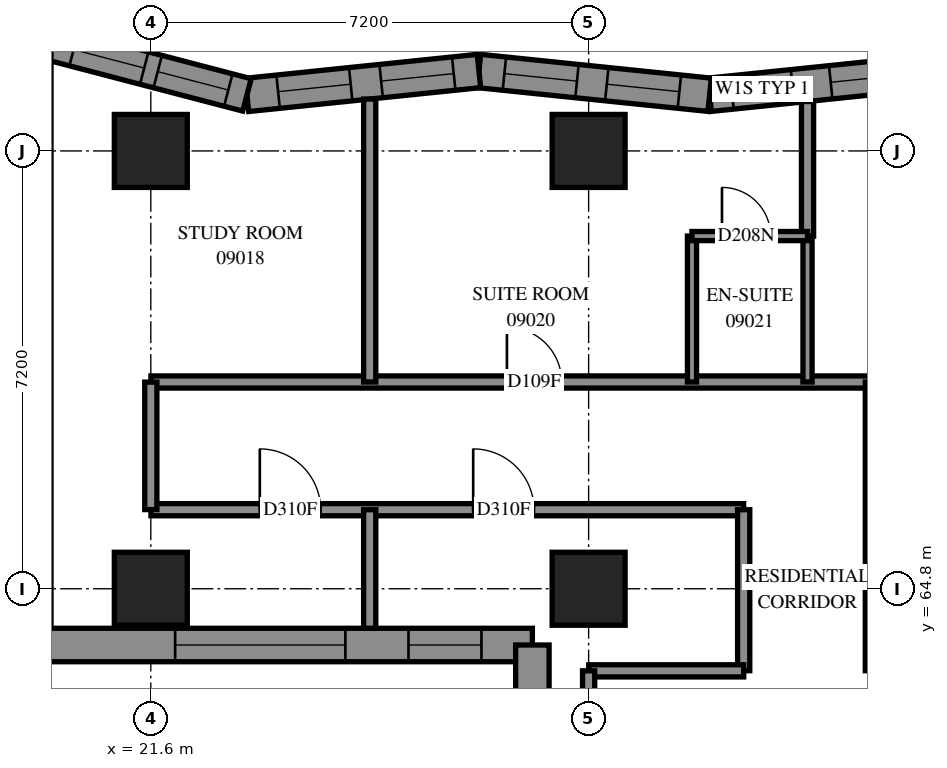
"""IFC4 building model, lengths in metres.
Left out: names, types, materials, properties, quantities, classifications, styles, units other than length and angle.
Written with IfcOpenShell. Run it as: python <this file> out.ifc"""

import sys

from ifc_helpers import new_model, si_unit, direction, frame, frame_2d, origin, origin_2d, place, context, subcontext, project, spatial, polyline, rectangle, outline, extrude, element, fill, save


model = new_model("IFC4")
c1 = context("Model", 3, precision=1e-05, world=origin(), true_north=direction((0.0, 1.0)))
c2 = subcontext(c1, "Body", "Model", "MODEL_VIEW")
j1 = project(units=[si_unit("LENGTHUNIT", "METRE"), si_unit("PLANEANGLEUNIT", "RADIAN")], contexts=[c1])
p1 = place(None, origin())
s1 = spatial("IfcSite", under=j1, at=p1, CompositionType="ELEMENT")
p2 = place(p1, origin())
s2 = spatial("IfcBuilding", under=s1, at=p2, CompositionType="ELEMENT")
p3 = place(p2, frame((0.0, 0.0, 37.2)))
s3 = spatial("IfcBuildingStorey", under=s2, at=p3, CompositionType="ELEMENT", Elevation=37.2)
for number, where, z_axis, x_axis in (
    (1, (21.6, 64.8, 0.0), (0.0, 0.0, 1.0), (1.0, 0.0, 0.0)),
    (2, (21.6, 72.0, 0.0), (0.0, 0.0, 1.0), (1.0, 0.0, 0.0)),
    (3, (28.8, 64.8, 0.0), (0.0, 0.0, 1.0), (1.0, 0.0, 0.0)),
    (4, (28.8, 72.0, 0.0), (0.0, 0.0, 1.0), (1.0, 0.0, 0.0)),
):
    element("IfcColumn", number, at=place(p3, frame(where, z_axis=z_axis, x_axis=x_axis)), inside=s3, PredefinedType="COLUMN", context=c2, shape_type="SweptSolid", body=[
        extrude(rectangle(XDim=1.2, YDim=1.2, at=origin_2d()), origin(), (0.0, 0.0, 1.0), 3.1),
    ])
p4 = place(p3, frame((34.584, 73.314, 0.0), z_axis=(0.0, 0.0, 1.0), x_axis=(-0.9947304076, -0.1025251975, 0.0)))
e5 = element("IfcWall", 5, at=p4, inside=s3, PredefinedType="SOLIDWALL", context=c2, shape_type="SweptSolid", body=[
    extrude(outline(polyline([(-0.028, -0.275), (3.785, -0.275), (3.842, 0.275), (0.028, 0.275), (-0.028, -0.275)])), origin(), (0.0, 0.0, 1.0), 3.1),
])
p5 = place(p4, frame((0.612, 0.0, 0.5)))
e6 = element("IfcOpeningElement", 6, at=p5, cuts=e5, PredefinedType="OPENING", context=c2, shape_type="SweptSolid", body=[
    extrude(rectangle(XDim=1.2, YDim=2.45, at=frame_2d((0.6, 1.225))), frame((0.0, 0.285, 0.0), z_axis=(0.0, -1.0, 0.0), x_axis=(1.0, 0.0, 0.0)), (0.0, 0.0, 1.0), 0.57),
])
p6 = place(p4, frame((2.444, 0.0, 0.45)))
e7 = element("IfcOpeningElement", 7, at=p6, cuts=e5, PredefinedType="OPENING", context=c2, shape_type="SweptSolid", body=[
    extrude(rectangle(XDim=1.0, YDim=2.5, at=frame_2d((0.5, 1.25))), frame((0.0, 0.285, 0.0), z_axis=(0.0, -1.0, 0.0), x_axis=(1.0, 0.0, 0.0)), (0.0, 0.0, 1.0), 0.57),
])
p7 = place(p3, frame((30.79, 72.924, 0.0), z_axis=(0.0, 0.0, 1.0), x_axis=(-0.9947306832, 0.1025225234, 0.0)))
e8 = element("IfcWall", 8, at=p7, inside=s3, PredefinedType="SOLIDWALL", context=c2, shape_type="SweptSolid", body=[
    extrude(outline(polyline([(0.028, -0.275), (3.842, -0.275), (3.785, 0.275), (-0.028, 0.275), (0.028, -0.275)])), origin(), (0.0, 0.0, 1.0), 3.1),
])
p8 = place(p7, frame((0.5, 0.0, 0.5)))
e9 = element("IfcOpeningElement", 9, at=p8, cuts=e8, PredefinedType="OPENING", context=c2, shape_type="SweptSolid", body=[
    extrude(rectangle(XDim=1.2, YDim=2.45, at=frame_2d((0.6, 1.225))), frame((0.0, 0.285, 0.0), z_axis=(0.0, -1.0, 0.0), x_axis=(1.0, 0.0, 0.0)), (0.0, 0.0, 1.0), 0.57),
])
p9 = place(p7, frame((2.193, 0.0, 0.5)))
e10 = element("IfcOpeningElement", 10, at=p9, cuts=e8, PredefinedType="OPENING", context=c2, shape_type="SweptSolid", body=[
    extrude(rectangle(XDim=1.2, YDim=2.45, at=frame_2d((0.6, 1.225))), frame((0.0, 0.285, 0.0), z_axis=(0.0, -1.0, 0.0), x_axis=(1.0, 0.0, 0.0)), (0.0, 0.0, 1.0), 0.57),
])
p10 = place(p3, frame((26.996, 73.314, 0.0), z_axis=(0.0, 0.0, 1.0), x_axis=(-0.9947305582, -0.1025237367, 0.0)))
e11 = element("IfcWall", 11, at=p10, inside=s3, PredefinedType="SOLIDWALL", context=c2, shape_type="SweptSolid", body=[
    extrude(outline(polyline([(-0.028, -0.275), (3.785, -0.275), (3.885, 0.275), (0.028, 0.275), (-0.028, -0.275)])), origin(), (0.0, 0.0, 1.0), 3.1),
])
p11 = place(p10, frame((0.417, 0.0, 0.5)))
e12 = element("IfcOpeningElement", 12, at=p11, cuts=e11, PredefinedType="OPENING", context=c2, shape_type="SweptSolid", body=[
    extrude(rectangle(XDim=1.2, YDim=2.45, at=frame_2d((0.6, 1.225))), frame((0.0, 0.285, 0.0), z_axis=(0.0, -1.0, 0.0), x_axis=(1.0, 0.0, 0.0)), (0.0, 0.0, 1.0), 0.57),
])
p12 = place(p10, frame((2.12, 0.0, 0.5)))
e13 = element("IfcOpeningElement", 13, at=p12, cuts=e11, PredefinedType="OPENING", context=c2, shape_type="SweptSolid", body=[
    extrude(rectangle(XDim=1.2, YDim=2.45, at=frame_2d((0.6, 1.225))), frame((0.0, 0.285, 0.0), z_axis=(0.0, -1.0, 0.0), x_axis=(1.0, 0.0, 0.0)), (0.0, 0.0, 1.0), 0.57),
])
p13 = place(p3, frame((23.181, 72.921, 0.0), z_axis=(0.0, 0.0, 1.0), x_axis=(-0.9675320185, 0.252748478, 0.0)))
e14 = element("IfcWall", 14, at=p13, inside=s3, PredefinedType="SOLIDWALL", context=c2, shape_type="SweptSolid", body=[
    extrude(outline(polyline([(0.05, -0.275), (3.971, -0.275), (3.259, 0.275), (-0.05, 0.275), (0.05, -0.275)])), origin(), (0.0, 0.0, 1.0), 3.1),
])
p14 = place(p13, frame((0.317, 0.0, 0.5)))
e15 = element("IfcOpeningElement", 15, at=p14, cuts=e14, PredefinedType="OPENING", context=c2, shape_type="SweptSolid", body=[
    extrude(rectangle(XDim=1.2, YDim=2.45, at=frame_2d((0.6, 1.225))), frame((0.0, 0.285, 0.0), z_axis=(0.0, -1.0, 0.0), x_axis=(1.0, 0.0, 0.0)), (0.0, 0.0, 1.0), 0.57),
])
p15 = place(p13, frame((1.746, 0.0, 0.5)))
e16 = element("IfcOpeningElement", 16, at=p15, cuts=e14, PredefinedType="OPENING", context=c2, shape_type="SweptSolid", body=[
    extrude(rectangle(XDim=1.2, YDim=2.45, at=frame_2d((0.6, 1.225))), frame((0.0, 0.285, 0.0), z_axis=(0.0, -1.0, 0.0), x_axis=(1.0, 0.0, 0.0)), (0.0, 0.0, 1.0), 0.57),
])
p16 = place(p3, frame((19.684, 63.875, 0.0), z_axis=(0.0, 0.0, 1.0), x_axis=(1.0, 0.0, 0.0)))
e17 = element("IfcWall", 17, at=p16, inside=s3, PredefinedType="SOLIDWALL", context=c2, shape_type="SweptSolid", body=[
    extrude(outline(polyline([(-0.275, -0.275), (7.916, -0.275), (8.466, 0.275), (0.275, 0.275), (-0.275, -0.275)])), origin(), (0.0, 0.0, 1.0), 3.1),
])
p17 = place(p16, frame((2.316, 0.0, 0.5)))
e18 = element("IfcOpeningElement", 18, at=p17, cuts=e17, PredefinedType="OPENING", context=c2, shape_type="SweptSolid", body=[
    extrude(rectangle(XDim=2.8, YDim=2.45, at=frame_2d((1.4, 1.225))), frame((0.0, 0.285, 0.0), z_axis=(0.0, -1.0, 0.0), x_axis=(1.0, 0.0, 0.0)), (0.0, 0.0, 1.0), 0.57),
])
p18 = place(p16, frame((6.154, 0.0, 0.5)))
e19 = element("IfcOpeningElement", 19, at=p18, cuts=e17, PredefinedType="OPENING", context=c2, shape_type="SweptSolid", body=[
    extrude(rectangle(XDim=1.2, YDim=2.45, at=frame_2d((0.6, 1.225))), frame((0.0, 0.285, 0.0), z_axis=(0.0, -1.0, 0.0), x_axis=(1.0, 0.0, 0.0)), (0.0, 0.0, 1.0), 0.57),
])
p19 = place(p3, frame((27.875, 63.875, 0.0), z_axis=(0.0, 0.0, 1.0), x_axis=(0.0, -1.0, 0.0)))
e20 = element("IfcWall", 20, at=p19, inside=s3, PredefinedType="SOLIDWALL", context=c2, shape_type="SweptSolid", body=[
    extrude(outline(polyline([(0.275, -0.275), (7.475, -0.275), (6.925, 0.275), (-0.275, 0.275), (0.275, -0.275)])), origin(), (0.0, 0.0, 1.0), 3.1),
])
p20 = place(p19, frame((0.838, 0.0, 0.5)))
e21 = element("IfcOpeningElement", 21, at=p20, cuts=e20, PredefinedType="OPENING", context=c2, shape_type="SweptSolid", body=[
    extrude(rectangle(XDim=1.2, YDim=2.45, at=frame_2d((0.6, 1.225))), frame((0.0, 0.285, 0.0), z_axis=(0.0, -1.0, 0.0), x_axis=(1.0, 0.0, 0.0)), (0.0, 0.0, 1.0), 0.57),
])
p21 = place(p19, frame((3.3, 0.0, 0.45)))
e22 = element("IfcOpeningElement", 22, at=p21, cuts=e20, PredefinedType="OPENING", context=c2, shape_type="SweptSolid", body=[
    extrude(rectangle(XDim=1.3, YDim=2.5, at=frame_2d((0.65, 1.25))), frame((0.0, 0.285, 0.0), z_axis=(0.0, -1.0, 0.0), x_axis=(1.0, 0.0, 0.0)), (0.0, 0.0, 1.0), 0.57),
])
p22 = place(p19, frame((5.05, 0.0, 0.45)))
e23 = element("IfcOpeningElement", 23, at=p22, cuts=e20, PredefinedType="OPENING", context=c2, shape_type="SweptSolid", body=[
    extrude(rectangle(XDim=0.8, YDim=2.5, at=frame_2d((0.4, 1.25))), frame((0.0, 0.285, 0.0), z_axis=(0.0, -1.0, 0.0), x_axis=(1.0, 0.0, 0.0)), (0.0, 0.0, 1.0), 0.57),
])
p23 = place(p3, frame((21.602, 68.2, 0.0), z_axis=(0.0, 0.0, 1.0), x_axis=(1.0, 0.0, 0.0)))
e24 = element("IfcWall", 24, at=p23, inside=s3, PredefinedType="PARTITIONING", context=c2, shape_type="SweptSolid", body=[
    extrude(rectangle(XDim=11.848, YDim=0.2, at=frame_2d((5.924, 0.0))), origin(), (0.0, 0.0, 1.0), 3.1),
])
p24 = place(p23, frame((5.855, 0.0, 0.0)))
e25 = element("IfcOpeningElement", 25, at=p24, cuts=e24, PredefinedType="OPENING", context=c2, shape_type="SweptSolid", body=[
    extrude(rectangle(XDim=0.9, YDim=2.1, at=frame_2d((0.45, 1.05))), frame((0.0, 0.11, 0.0), z_axis=(0.0, -1.0, 0.0), x_axis=(1.0, 0.0, 0.0)), (0.0, 0.0, 1.0), 0.22),
])
p25 = place(p3, frame((21.602, 66.1, 0.0), z_axis=(0.0, 0.0, 1.0), x_axis=(1.0, 0.0, 0.0)))
e26 = element("IfcWall", 26, at=p25, inside=s3, PredefinedType="PARTITIONING", context=c2, shape_type="SweptSolid", body=[
    extrude(rectangle(XDim=9.748, YDim=0.2, at=frame_2d((4.874, 0.0))), origin(), (0.0, 0.0, 1.0), 3.1),
])
p26 = place(p25, frame((1.791, 0.0, 0.0)))
e27 = element("IfcOpeningElement", 27, at=p26, cuts=e26, PredefinedType="OPENING", context=c2, shape_type="SweptSolid", body=[
    extrude(rectangle(XDim=1.0, YDim=2.1, at=frame_2d((0.5, 1.05))), frame((0.0, 0.11, 0.0), z_axis=(0.0, -1.0, 0.0), x_axis=(1.0, 0.0, 0.0)), (0.0, 0.0, 1.0), 0.22),
])
p27 = place(p25, frame((5.3, 0.0, 0.0)))
e28 = element("IfcOpeningElement", 28, at=p27, cuts=e26, PredefinedType="OPENING", context=c2, shape_type="SweptSolid", body=[
    extrude(rectangle(XDim=1.0, YDim=2.1, at=frame_2d((0.5, 1.05))), frame((0.0, 0.11, 0.0), z_axis=(0.0, -1.0, 0.0), x_axis=(1.0, 0.0, 0.0)), (0.0, 0.0, 1.0), 0.22),
])
p28 = place(p3, frame((33.45, 63.452, 0.0), z_axis=(0.0, 0.0, 1.0), x_axis=(0.0, 1.0, 0.0)))
e29 = element("IfcWall", 29, at=p28, inside=s3, PredefinedType="PARTITIONING", context=c2, shape_type="SweptSolid", body=[
    extrude(rectangle(XDim=4.748, YDim=0.2, at=frame_2d((2.374, 0.0))), origin(), (0.0, 0.0, 1.0), 3.1),
])
p29 = place(p3, frame((25.2, 68.2, 0.0), z_axis=(0.0, 0.0, 1.0), x_axis=(0.0, 1.0, 0.0)))
e30 = element("IfcWall", 30, at=p29, inside=s3, PredefinedType="PARTITIONING", context=c2, shape_type="SweptSolid", body=[
    extrude(rectangle(XDim=4.653, YDim=0.2, at=frame_2d((2.326, 0.0))), origin(), (0.0, 0.0, 1.0), 3.1),
])
p30 = place(p3, frame((31.35, 63.452, 0.0), z_axis=(0.0, 0.0, 1.0), x_axis=(0.0, 1.0, 0.0)))
e31 = element("IfcWall", 31, at=p30, inside=s3, PredefinedType="PARTITIONING", context=c2, shape_type="SweptSolid", body=[
    extrude(rectangle(XDim=2.648, YDim=0.2, at=frame_2d((1.324, 0.0))), origin(), (0.0, 0.0, 1.0), 3.1),
])
p31 = place(p3, frame((28.802, 63.45, 0.0), z_axis=(0.0, 0.0, 1.0), x_axis=(1.0, 0.0, 0.0)))
e32 = element("IfcWall", 32, at=p31, inside=s3, PredefinedType="PARTITIONING", context=c2, shape_type="SweptSolid", body=[
    extrude(rectangle(XDim=2.548, YDim=0.2, at=frame_2d((1.274, 0.0))), origin(), (0.0, 0.0, 1.0), 3.1),
])
for number, where, z_axis, x_axis in (
    (33, (30.5, 68.2, 0.0), (0.0, 0.0, 1.0), (0.0, 1.0, 0.0)),
    (34, (32.4, 68.2, 0.0), (0.0, 0.0, 1.0), (0.0, 1.0, 0.0)),
):
    element("IfcWall", number, at=place(p3, frame(where, z_axis=z_axis, x_axis=x_axis)), inside=s3, PredefinedType="PARTITIONING", context=c2, shape_type="SweptSolid", body=[
        extrude(rectangle(XDim=2.4, YDim=0.15, at=frame_2d((1.2, 0.0))), origin(), (0.0, 0.0, 1.0), 3.1),
    ])
p32 = place(p3, frame((32.4, 70.6, 0.0), z_axis=(0.0, 0.0, 1.0), x_axis=(0.0, 1.0, 0.0)))
e35 = element("IfcWall", 35, at=p32, inside=s3, PredefinedType="PARTITIONING", context=c2, shape_type="SweptSolid", body=[
    extrude(rectangle(XDim=2.213, YDim=0.2, at=frame_2d((1.107, 0.0))), origin(), (0.0, 0.0, 1.0), 3.1),
])
p33 = place(p3, frame((28.8, 61.35, 0.0), z_axis=(0.0, 0.0, 1.0), x_axis=(0.0, 1.0, 0.0)))
e36 = element("IfcWall", 36, at=p33, inside=s3, PredefinedType="PARTITIONING", context=c2, shape_type="SweptSolid", body=[
    extrude(rectangle(XDim=2.1, YDim=0.2, at=frame_2d((1.05, 0.0))), origin(), (0.0, 0.0, 1.0), 2.6),
])
p34 = place(p3, frame((21.6, 66.102, 0.0), z_axis=(0.0, 0.0, 1.0), x_axis=(0.0, 1.0, 0.0)))
e37 = element("IfcWall", 37, at=p34, inside=s3, PredefinedType="PARTITIONING", context=c2, shape_type="SweptSolid", body=[
    extrude(rectangle(XDim=2.096, YDim=0.2, at=frame_2d((1.048, 0.0))), origin(), (0.0, 0.0, 1.0), 2.6),
])
p35 = place(p3, frame((30.5, 70.6, 0.0), z_axis=(0.0, 0.0, 1.0), x_axis=(1.0, 0.0, 0.0)))
e38 = element("IfcWall", 38, at=p35, inside=s3, PredefinedType="PARTITIONING", context=c2, shape_type="SweptSolid", body=[
    extrude(rectangle(XDim=1.9, YDim=0.15, at=frame_2d((0.95, 0.0))), origin(), (0.0, 0.0, 1.0), 3.1),
])
p36 = place(p35, frame((0.493, 0.0, 0.0)))
e39 = element("IfcOpeningElement", 39, at=p36, cuts=e38, PredefinedType="OPENING", context=c2, shape_type="SweptSolid", body=[
    extrude(rectangle(XDim=0.8, YDim=2.1, at=frame_2d((0.4, 1.05))), frame((0.0, 0.085, 0.0), z_axis=(0.0, -1.0, 0.0), x_axis=(1.0, 0.0, 0.0)), (0.0, 0.0, 1.0), 0.17),
])
p37 = place(p3, frame((25.2, 64.15, 0.0), z_axis=(0.0, 0.0, 1.0), x_axis=(0.0, 1.0, 0.0)))
e40 = element("IfcWall", 40, at=p37, inside=s3, PredefinedType="PARTITIONING", context=c2, shape_type="SweptSolid", body=[
    extrude(rectangle(XDim=1.95, YDim=0.2, at=frame_2d((0.975, 0.0))), origin(), (0.0, 0.0, 1.0), 3.1),
])
p38 = place(p5, origin())
e41 = element("IfcWindow", 41, at=p38, inside=s3, PartitioningType="SINGLE_PANEL", PredefinedType="WINDOW", context=c2, shape_type="SweptSolid", body=[
    extrude(rectangle(XDim=1.2, YDim=2.45, at=frame_2d((0.6, 1.225))), frame((0.0, 0.155, 0.0), z_axis=(0.0, -1.0, 0.0), x_axis=(1.0, 0.0, 0.0)), (0.0, 0.0, 1.0), 0.06),
])
fill(e6, e41)
p39 = place(p8, origin())
e42 = element("IfcWindow", 42, at=p39, inside=s3, PartitioningType="SINGLE_PANEL", PredefinedType="WINDOW", context=c2, shape_type="SweptSolid", body=[
    extrude(rectangle(XDim=1.2, YDim=2.45, at=frame_2d((0.6, 1.225))), frame((0.0, 0.155, 0.0), z_axis=(0.0, -1.0, 0.0), x_axis=(1.0, 0.0, 0.0)), (0.0, 0.0, 1.0), 0.06),
])
fill(e9, e42)
p40 = place(p9, origin())
e43 = element("IfcWindow", 43, at=p40, inside=s3, PartitioningType="SINGLE_PANEL", PredefinedType="WINDOW", context=c2, shape_type="SweptSolid", body=[
    extrude(rectangle(XDim=1.2, YDim=2.45, at=frame_2d((0.6, 1.225))), frame((0.0, 0.155, 0.0), z_axis=(0.0, -1.0, 0.0), x_axis=(1.0, 0.0, 0.0)), (0.0, 0.0, 1.0), 0.06),
])
fill(e10, e43)
p41 = place(p11, origin())
e44 = element("IfcWindow", 44, at=p41, inside=s3, PartitioningType="SINGLE_PANEL", PredefinedType="WINDOW", context=c2, shape_type="SweptSolid", body=[
    extrude(rectangle(XDim=1.2, YDim=2.45, at=frame_2d((0.6, 1.225))), frame((0.0, 0.155, 0.0), z_axis=(0.0, -1.0, 0.0), x_axis=(1.0, 0.0, 0.0)), (0.0, 0.0, 1.0), 0.06),
])
fill(e12, e44)
p42 = place(p12, origin())
e45 = element("IfcWindow", 45, at=p42, inside=s3, PartitioningType="SINGLE_PANEL", PredefinedType="WINDOW", context=c2, shape_type="SweptSolid", body=[
    extrude(rectangle(XDim=1.2, YDim=2.45, at=frame_2d((0.6, 1.225))), frame((0.0, 0.155, 0.0), z_axis=(0.0, -1.0, 0.0), x_axis=(1.0, 0.0, 0.0)), (0.0, 0.0, 1.0), 0.06),
])
fill(e13, e45)
p43 = place(p14, origin())
e46 = element("IfcWindow", 46, at=p43, inside=s3, PartitioningType="SINGLE_PANEL", PredefinedType="WINDOW", context=c2, shape_type="SweptSolid", body=[
    extrude(rectangle(XDim=1.2, YDim=2.45, at=frame_2d((0.6, 1.225))), frame((0.0, 0.155, 0.0), z_axis=(0.0, -1.0, 0.0), x_axis=(1.0, 0.0, 0.0)), (0.0, 0.0, 1.0), 0.06),
])
fill(e15, e46)
p44 = place(p15, origin())
e47 = element("IfcWindow", 47, at=p44, inside=s3, PartitioningType="SINGLE_PANEL", PredefinedType="WINDOW", context=c2, shape_type="SweptSolid", body=[
    extrude(rectangle(XDim=1.2, YDim=2.45, at=frame_2d((0.6, 1.225))), frame((0.0, 0.155, 0.0), z_axis=(0.0, -1.0, 0.0), x_axis=(1.0, 0.0, 0.0)), (0.0, 0.0, 1.0), 0.06),
])
fill(e16, e47)
p45 = place(p17, origin())
e48 = element("IfcWindow", 48, at=p45, inside=s3, PartitioningType="SINGLE_PANEL", PredefinedType="WINDOW", context=c2, shape_type="SweptSolid", body=[
    extrude(rectangle(XDim=2.8, YDim=2.45, at=frame_2d((1.4, 1.225))), frame((0.0, 0.155, 0.0), z_axis=(0.0, -1.0, 0.0), x_axis=(1.0, 0.0, 0.0)), (0.0, 0.0, 1.0), 0.06),
])
fill(e18, e48)
p46 = place(p18, origin())
e49 = element("IfcWindow", 49, at=p46, inside=s3, PartitioningType="SINGLE_PANEL", PredefinedType="WINDOW", context=c2, shape_type="SweptSolid", body=[
    extrude(rectangle(XDim=1.2, YDim=2.45, at=frame_2d((0.6, 1.225))), frame((0.0, 0.155, 0.0), z_axis=(0.0, -1.0, 0.0), x_axis=(1.0, 0.0, 0.0)), (0.0, 0.0, 1.0), 0.06),
])
fill(e19, e49)
p47 = place(p26, origin())
e50 = element("IfcDoor", 50, at=p47, inside=s3, OperationType="SINGLE_SWING_RIGHT", PredefinedType="DOOR", context=c2, shape_type="SweptSolid", body=[
    extrude(rectangle(XDim=1.0, YDim=2.1, at=frame_2d((0.5, 1.05))), frame((0.0, 0.025, 0.0), z_axis=(0.0, -1.0, 0.0), x_axis=(1.0, 0.0, 0.0)), (0.0, 0.0, 1.0), 0.05),
])
fill(e27, e50)
p48 = place(p27, origin())
e51 = element("IfcDoor", 51, at=p48, inside=s3, OperationType="SINGLE_SWING_RIGHT", PredefinedType="DOOR", context=c2, shape_type="SweptSolid", body=[
    extrude(rectangle(XDim=1.0, YDim=2.1, at=frame_2d((0.5, 1.05))), frame((0.0, 0.025, 0.0), z_axis=(0.0, -1.0, 0.0), x_axis=(1.0, 0.0, 0.0)), (0.0, 0.0, 1.0), 0.05),
])
fill(e28, e51)
p49 = place(p24, origin())
e52 = element("IfcDoor", 52, at=p49, inside=s3, OperationType="SINGLE_SWING_LEFT", PredefinedType="DOOR", context=c2, shape_type="SweptSolid", body=[
    extrude(rectangle(XDim=0.9, YDim=2.1, at=frame_2d((0.45, 1.05))), frame((0.0, 0.025, 0.0), z_axis=(0.0, -1.0, 0.0), x_axis=(1.0, 0.0, 0.0)), (0.0, 0.0, 1.0), 0.05),
])
fill(e25, e52)
p50 = place(p36, origin())
e53 = element("IfcDoor", 53, at=p50, inside=s3, OperationType="SINGLE_SWING_RIGHT", PredefinedType="DOOR", context=c2, shape_type="SweptSolid", body=[
    extrude(rectangle(XDim=0.8, YDim=2.1, at=frame_2d((0.4, 1.05))), frame((0.0, 0.025, 0.0), z_axis=(0.0, -1.0, 0.0), x_axis=(1.0, 0.0, 0.0)), (0.0, 0.0, 1.0), 0.05),
])
fill(e39, e53)
p51 = place(p6, origin())
e54 = element("IfcWindow", 54, at=p51, inside=s3, PartitioningType="SINGLE_PANEL", PredefinedType="WINDOW", context=c2, shape_type="SweptSolid", body=[
    extrude(rectangle(XDim=1.0, YDim=2.5, at=frame_2d((0.5, 1.25))), frame((0.0, 0.155, 0.0), z_axis=(0.0, -1.0, 0.0), x_axis=(1.0, 0.0, 0.0)), (0.0, 0.0, 1.0), 0.06),
])
fill(e7, e54)
save(model, sys.argv[1])
